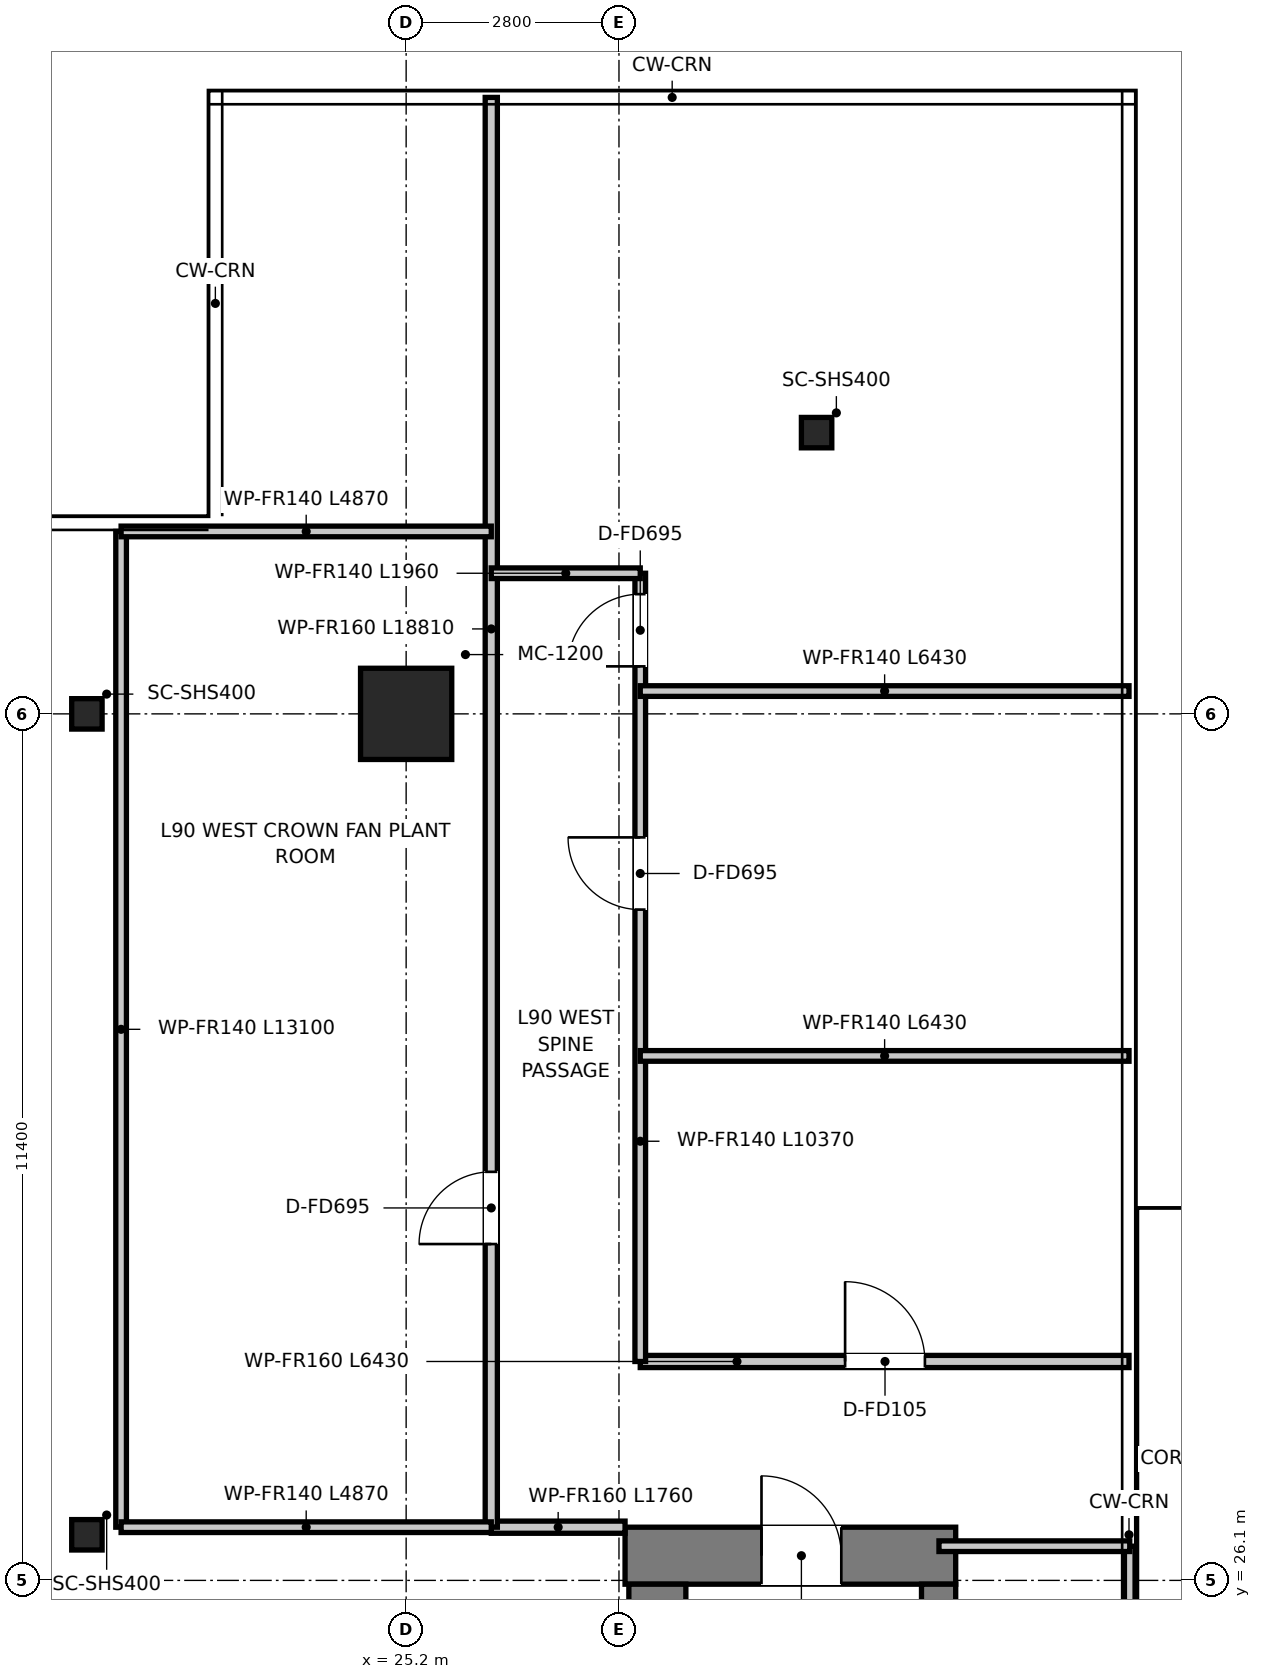
"""IFC4 building model, lengths in metres.
Left out: names, types, materials, properties, quantities, classifications, styles, units other than length and angle.
Written with IfcOpenShell. Run it as: python <this file> out.ifc"""

import sys

from ifc_helpers import new_model, si_unit, direction, frame, frame_2d, origin, origin_2d, place, context, subcontext, project, spatial, rectangle, hollow_rectangle, extrude, source, transform, mapped, element, fill, save


model = new_model("IFC4")
c1 = context("Model", 3, precision=1e-05, world=origin(), true_north=direction((0.0, 1.0)))
c2 = subcontext(c1, "Body", "Model", "MODEL_VIEW")
j1 = project(units=[si_unit("LENGTHUNIT", "METRE"), si_unit("PLANEANGLEUNIT", "RADIAN")], contexts=[c1])
p1 = place(None, origin())
s1 = spatial("IfcSite", under=j1, at=p1, CompositionType="ELEMENT")
p2 = place(p1, origin())
s2 = spatial("IfcBuilding", under=s1, at=p2, CompositionType="ELEMENT")
p3 = place(p2, frame((0.0, 0.0, 367.05)))
s3 = spatial("IfcBuildingStorey", under=s2, at=p3, CompositionType="ELEMENT", Elevation=367.05)
p4 = place(p3, frame((28.08, 26.425, 0.0), z_axis=(0.0, 0.0, 1.0), x_axis=(1.0, 0.0, 0.0)))
e1 = element("IfcWall", 1, at=p4, inside=s3, PredefinedType="SHEAR", context=c2, shape_type="SweptSolid", body=[
    extrude(rectangle(XDim=4.35, YDim=0.75, at=frame_2d((2.175, 0.0))), origin(), (0.0, 0.0, 1.0), 3.8),
])
p5 = place(p4, frame((1.795, 0.0, 0.0)))
e2 = element("IfcOpeningElement", 2, at=p5, cuts=e1, PredefinedType="OPENING", context=c2, shape_type="SweptSolid", body=[
    extrude(rectangle(XDim=1.05, YDim=2.1, at=frame_2d((0.525, 1.05))), frame((0.0, 0.385, 0.0), z_axis=(0.0, -1.0, 0.0), x_axis=(1.0, 0.0, 0.0)), (0.0, 0.0, 1.0), 0.77),
])
p6 = place(p3, frame((28.505, 11.25, 0.0), z_axis=(0.0, 0.0, 1.0), x_axis=(0.0, 1.0, 0.0)))
e3 = element("IfcWall", 3, at=p6, inside=s3, PredefinedType="SHEAR", context=c2, shape_type="SweptSolid", body=[
    extrude(rectangle(XDim=14.8, YDim=0.75, at=frame_2d((7.4, 0.0))), origin(), (0.0, 0.0, 1.0), 3.8),
])
p7 = place(p3, frame((32.205, 13.22, 0.0), z_axis=(0.0, 0.0, 1.0), x_axis=(0.0, 1.0, 0.0)))
e4 = element("IfcWall", 4, at=p7, inside=s3, PredefinedType="SHEAR", context=c2, shape_type="SweptSolid", body=[
    extrude(rectangle(XDim=12.83, YDim=0.45, at=frame_2d((6.415, 0.0))), origin(), (0.0, 0.0, 1.0), 3.8),
])
p8 = place(p7, frame((10.58, 0.0, 0.0)))
e5 = element("IfcOpeningElement", 5, at=p8, cuts=e4, PredefinedType="OPENING", context=c2, shape_type="SweptSolid", body=[
    extrude(rectangle(XDim=1.1, YDim=2.15, at=frame_2d((0.55, 1.075))), frame((0.0, 0.235, 0.0), z_axis=(0.0, -1.0, 0.0), x_axis=(1.0, 0.0, 0.0)), (0.0, 0.0, 1.0), 0.47),
])
m1 = source(origin(), c2, "Body", "SweptSolid", [
    extrude(rectangle(XDim=1.2, YDim=1.2, at=origin_2d()), origin(), (0.0, 0.0, 1.0), 3.8),
])
p9 = place(p3, frame((25.2, 37.5, 0.0), z_axis=(0.0, 0.0, 1.0), x_axis=(1.0, 0.0, 0.0)))
e6 = element("IfcColumn", 6, at=p9, inside=s3, PredefinedType="USERDEFINED", context=c2, shape_type="MappedRepresentation", body=[
    mapped(m1, transform((0.0, 0.0, 0.0), x_axis=(1.0, 0.0, 0.0), y_axis=(0.0, 1.0, 0.0), z_axis=(0.0, 0.0, 1.0), scale=1.0)),
])
m2 = source(origin(), c2, "Body", "SweptSolid", [
    extrude(hollow_rectangle(XDim=0.4, YDim=0.4, WallThickness=0.025, at=origin_2d()), origin(), (0.0, 0.0, 1.0), 3.8),
])
for number, where, z_axis, x_axis in (
    (7, (21.0, 26.7, 0.0), (0.0, 0.0, 1.0), (1.0, 0.0, 0.0)),
    (8, (21.0, 37.5, 0.0), (0.0, 0.0, 1.0), (1.0, 0.0, 0.0)),
    (9, (30.6, 41.2, 0.0), (0.0, 0.0, 1.0), (1.0, 0.0, 0.0)),
):
    element("IfcColumn", number, at=place(p3, frame(where, z_axis=z_axis, x_axis=x_axis)), inside=s3, PredefinedType="COLUMN", context=c2, shape_type="MappedRepresentation", body=[
        mapped(m2, transform((0.0, 0.0, 0.0), x_axis=(1.0, 0.0, 0.0), y_axis=(0.0, 1.0, 0.0), z_axis=(0.0, 0.0, 1.0), scale=1.0)),
    ])
p10 = place(p3, frame((34.72, 22.95, 0.0), z_axis=(0.0, 0.0, 1.0), x_axis=(0.0, 1.0, 0.0)))
e10 = element("IfcWall", 10, at=p10, inside=s3, PredefinedType="PARTITIONING", context=c2, shape_type="SweptSolid", body=[
    extrude(rectangle(XDim=3.6, YDim=0.14, at=frame_2d((1.8, 0.0))), origin(), (0.0, 0.0, 1.0), 3.5),
])
p11 = place(p3, frame((32.21, 26.55, 0.0), z_axis=(0.0, 0.0, 1.0), x_axis=(1.0, 0.0, 0.0)))
e11 = element("IfcWall", 11, at=p11, inside=s3, PredefinedType="PARTITIONING", context=c2, shape_type="SweptSolid", body=[
    extrude(rectangle(XDim=2.51, YDim=0.14, at=frame_2d((1.255, 0.0))), origin(), (0.0, 0.0, 1.0), 3.5),
])
p12 = place(p3, frame((28.28, 28.98, 0.0), z_axis=(0.0, 0.0, 1.0), x_axis=(1.0, 0.0, 0.0)))
e12 = element("IfcWall", 12, at=p12, inside=s3, PredefinedType="PARTITIONING", context=c2, shape_type="SweptSolid", body=[
    extrude(rectangle(XDim=6.43, YDim=0.16, at=frame_2d((3.215, 0.0))), origin(), (0.0, 0.0, 1.0), 3.01),
])
p13 = place(p12, frame((2.695, 0.0, 0.0)))
e13 = element("IfcOpeningElement", 13, at=p13, cuts=e12, PredefinedType="OPENING", context=c2, shape_type="SweptSolid", body=[
    extrude(rectangle(XDim=1.05, YDim=2.1, at=frame_2d((0.525, 1.05))), frame((0.0, 0.09, 0.0), z_axis=(0.0, -1.0, 0.0), x_axis=(1.0, 0.0, 0.0)), (0.0, 0.0, 1.0), 0.18),
])
p14 = place(p3, frame((26.32, 26.8, 0.0), z_axis=(0.0, 0.0, 1.0), x_axis=(1.0, 0.0, 0.0)))
e14 = element("IfcWall", 14, at=p14, inside=s3, PredefinedType="PARTITIONING", context=c2, shape_type="SweptSolid", body=[
    extrude(rectangle(XDim=1.76, YDim=0.16, at=frame_2d((0.88, 0.0))), origin(), (0.0, 0.0, 1.0), 3.5),
])
p15 = place(p3, frame((26.32, 26.8, 0.0), z_axis=(0.0, 0.0, 1.0), x_axis=(0.0, 1.0, 0.0)))
e15 = element("IfcWall", 15, at=p15, inside=s3, PredefinedType="PARTITIONING", context=c2, shape_type="SweptSolid", body=[
    extrude(rectangle(XDim=18.81, YDim=0.16, at=frame_2d((9.405, 0.0))), origin(), (0.0, 0.0, 1.0), 3.01),
])
p16 = place(p15, frame((3.725, 0.0, 0.0)))
e16 = element("IfcOpeningElement", 16, at=p16, cuts=e15, PredefinedType="OPENING", context=c2, shape_type="SweptSolid", body=[
    extrude(rectangle(XDim=0.95, YDim=2.1, at=frame_2d((0.475, 1.05))), frame((0.0, 0.09, 0.0), z_axis=(0.0, -1.0, 0.0), x_axis=(1.0, 0.0, 0.0)), (0.0, 0.0, 1.0), 0.18),
])
p17 = place(p3, frame((21.45, 26.8, 0.0), z_axis=(0.0, 0.0, 1.0), x_axis=(0.0, 1.0, 0.0)))
e17 = element("IfcWall", 17, at=p17, inside=s3, PredefinedType="PARTITIONING", context=c2, shape_type="SweptSolid", body=[
    extrude(rectangle(XDim=13.1, YDim=0.14, at=frame_2d((6.55, 0.0))), origin(), (0.0, 0.0, 1.0), 3.01),
])
p18 = place(p3, frame((21.45, 26.8, 0.0), z_axis=(0.0, 0.0, 1.0), x_axis=(1.0, 0.0, 0.0)))
e18 = element("IfcWall", 18, at=p18, inside=s3, PredefinedType="PARTITIONING", context=c2, shape_type="SweptSolid", body=[
    extrude(rectangle(XDim=4.87, YDim=0.14, at=frame_2d((2.435, 0.0))), origin(), (0.0, 0.0, 1.0), 3.01),
])
p19 = place(p3, frame((21.45, 39.9, 0.0), z_axis=(0.0, 0.0, 1.0), x_axis=(1.0, 0.0, 0.0)))
e19 = element("IfcWall", 19, at=p19, inside=s3, PredefinedType="PARTITIONING", context=c2, shape_type="SweptSolid", body=[
    extrude(rectangle(XDim=4.87, YDim=0.14, at=frame_2d((2.435, 0.0))), origin(), (0.0, 0.0, 1.0), 3.5),
])
p20 = place(p3, frame((28.28, 28.98, 0.0), z_axis=(0.0, 0.0, 1.0), x_axis=(0.0, 1.0, 0.0)))
e20 = element("IfcWall", 20, at=p20, inside=s3, PredefinedType="PARTITIONING", context=c2, shape_type="SweptSolid", body=[
    extrude(rectangle(XDim=10.37, YDim=0.14, at=frame_2d((5.185, 0.0))), origin(), (0.0, 0.0, 1.0), 3.5),
])
p21 = place(p20, frame((5.945, 0.0, 0.0)))
e21 = element("IfcOpeningElement", 21, at=p21, cuts=e20, PredefinedType="OPENING", context=c2, shape_type="SweptSolid", body=[
    extrude(rectangle(XDim=0.95, YDim=2.1, at=frame_2d((0.475, 1.05))), frame((0.0, 0.08, 0.0), z_axis=(0.0, -1.0, 0.0), x_axis=(1.0, 0.0, 0.0)), (0.0, 0.0, 1.0), 0.16),
])
p22 = place(p20, frame((9.145, 0.0, 0.0)))
e22 = element("IfcOpeningElement", 22, at=p22, cuts=e20, PredefinedType="OPENING", context=c2, shape_type="SweptSolid", body=[
    extrude(rectangle(XDim=0.95, YDim=2.1, at=frame_2d((0.475, 1.05))), frame((0.0, 0.08, 0.0), z_axis=(0.0, -1.0, 0.0), x_axis=(1.0, 0.0, 0.0)), (0.0, 0.0, 1.0), 0.16),
])
for number, where, z_axis, x_axis in (
    (23, (28.28, 33.0, 0.0), (0.0, 0.0, 1.0), (1.0, 0.0, 0.0)),
    (24, (28.28, 37.8, 0.0), (0.0, 0.0, 1.0), (1.0, 0.0, 0.0)),
):
    element("IfcWall", number, at=place(p3, frame(where, z_axis=z_axis, x_axis=x_axis)), inside=s3, PredefinedType="PARTITIONING", context=c2, shape_type="SweptSolid", body=[
        extrude(rectangle(XDim=6.43, YDim=0.14, at=frame_2d((3.215, 0.0))), origin(), (0.0, 0.0, 1.0), 3.01),
    ])
p23 = place(p3, frame((26.32, 39.35, 0.0), z_axis=(0.0, 0.0, 1.0), x_axis=(1.0, 0.0, 0.0)))
e25 = element("IfcWall", 25, at=p23, inside=s3, PredefinedType="PARTITIONING", context=c2, shape_type="SweptSolid", body=[
    extrude(rectangle(XDim=1.96, YDim=0.14, at=frame_2d((0.98, 0.0))), origin(), (0.0, 0.0, 1.0), 3.01),
])
p24 = place(p5, origin())
e26 = element("IfcDoor", 26, at=p24, inside=s3, OperationType="SINGLE_SWING_LEFT", PredefinedType="DOOR", context=c2, shape_type="SweptSolid", body=[
    extrude(rectangle(XDim=1.05, YDim=2.1, at=frame_2d((0.525, 1.05))), frame((0.0, 0.025, 0.0), z_axis=(0.0, -1.0, 0.0), x_axis=(1.0, 0.0, 0.0)), (0.0, 0.0, 1.0), 0.05),
])
fill(e2, e26)
p25 = place(p13, origin())
e27 = element("IfcDoor", 27, at=p25, inside=s3, OperationType="SINGLE_SWING_LEFT", PredefinedType="DOOR", context=c2, shape_type="SweptSolid", body=[
    extrude(rectangle(XDim=1.05, YDim=2.1, at=frame_2d((0.525, 1.05))), frame((0.0, 0.025, 0.0), z_axis=(0.0, -1.0, 0.0), x_axis=(1.0, 0.0, 0.0)), (0.0, 0.0, 1.0), 0.05),
])
fill(e13, e27)
p26 = place(p21, origin())
e28 = element("IfcDoor", 28, at=p26, inside=s3, OperationType="SINGLE_SWING_RIGHT", PredefinedType="DOOR", context=c2, shape_type="SweptSolid", body=[
    extrude(rectangle(XDim=0.95, YDim=2.1, at=frame_2d((0.475, 1.05))), frame((0.0, 0.025, 0.0), z_axis=(0.0, -1.0, 0.0), x_axis=(1.0, 0.0, 0.0)), (0.0, 0.0, 1.0), 0.05),
])
fill(e21, e28)
p27 = place(p22, origin())
e29 = element("IfcDoor", 29, at=p27, inside=s3, OperationType="SINGLE_SWING_LEFT", PredefinedType="DOOR", context=c2, shape_type="SweptSolid", body=[
    extrude(rectangle(XDim=0.95, YDim=2.1, at=frame_2d((0.475, 1.05))), frame((0.0, 0.025, 0.0), z_axis=(0.0, -1.0, 0.0), x_axis=(1.0, 0.0, 0.0)), (0.0, 0.0, 1.0), 0.05),
])
fill(e22, e29)
p28 = place(p16, origin())
e30 = element("IfcDoor", 30, at=p28, inside=s3, OperationType="SINGLE_SWING_LEFT", PredefinedType="DOOR", context=c2, shape_type="SweptSolid", body=[
    extrude(rectangle(XDim=0.95, YDim=2.1, at=frame_2d((0.475, 1.05))), frame((0.0, 0.025, 0.0), z_axis=(0.0, -1.0, 0.0), x_axis=(1.0, 0.0, 0.0)), (0.0, 0.0, 1.0), 0.05),
])
fill(e16, e30)
save(model, sys.argv[1])
